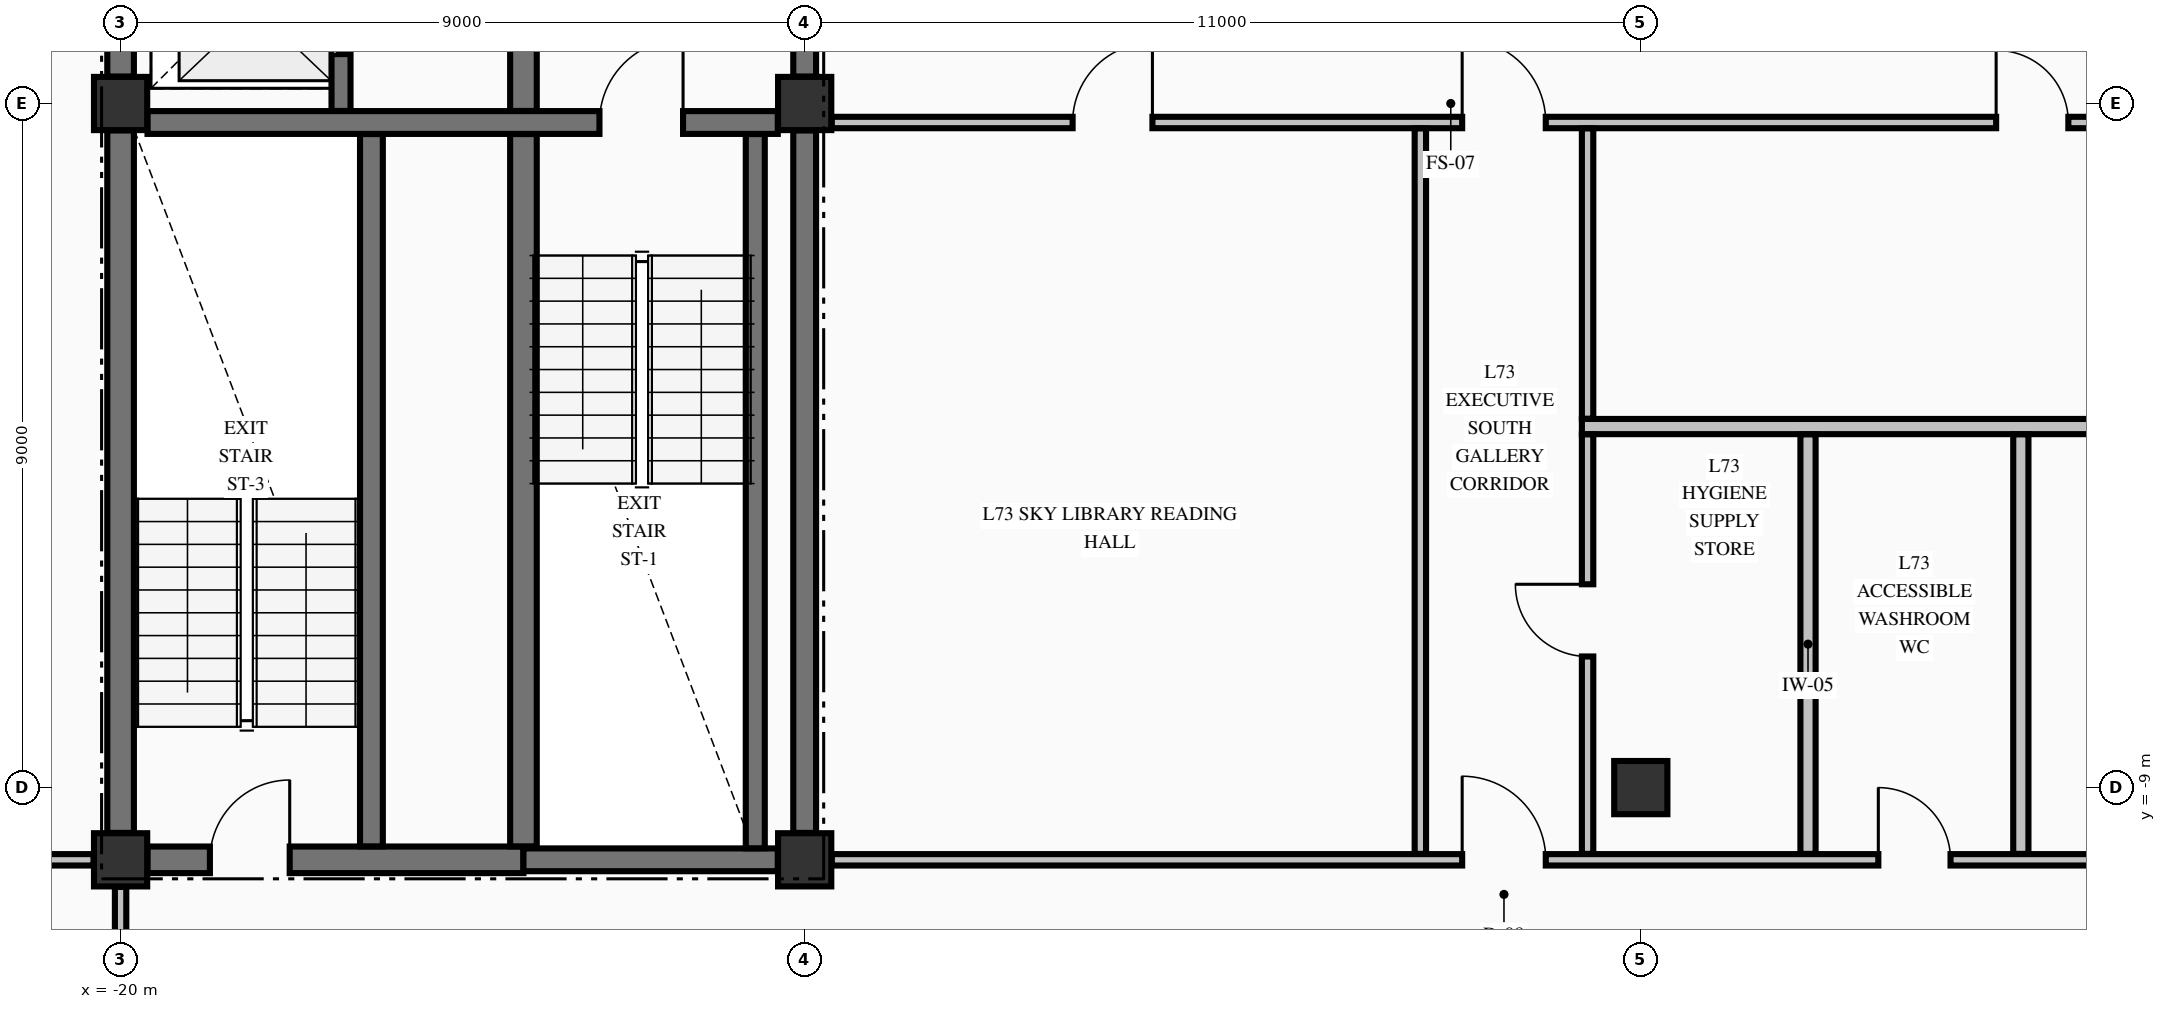
"""IFC4 building model, lengths in metres.
Left out: names, types, materials, properties, quantities, classifications, styles, units other than length and angle.
Written with IfcOpenShell. Run it as: python <this file> out.ifc"""

import sys

from ifc_helpers import new_model, si_unit, direction, frame, frame_2d, origin, origin_2d, place, context, subcontext, project, spatial, rectangle, extrude, element, fill, save


model = new_model("IFC4")
c1 = context("Model", 3, precision=1e-05, world=origin(), true_north=direction((0.0, 1.0)))
c2 = subcontext(c1, "Body", "Model", "MODEL_VIEW")
j1 = project(units=[si_unit("LENGTHUNIT", "METRE"), si_unit("PLANEANGLEUNIT", "RADIAN")], contexts=[c1])
p1 = place(None, origin())
s1 = spatial("IfcSite", under=j1, at=p1, CompositionType="ELEMENT")
p2 = place(p1, origin())
s2 = spatial("IfcBuilding", under=s1, at=p2, CompositionType="ELEMENT")
p3 = place(p2, frame((0.0, 0.0, 274.32)))
s3 = spatial("IfcBuildingStorey", under=s2, at=p3, CompositionType="ELEMENT", Elevation=274.32)
for number, where, z_axis, x_axis in (
    (1, (-20.0, -9.95, -0.25), (0.0, 0.0, 1.0), (1.0, 0.0, 0.0)),
    (2, (-11.0, -9.95, -0.25), (0.0, 0.0, 1.0), (1.0, 0.0, 0.0)),
    (3, (-11.0, 0.0, -0.25), (0.0, 0.0, 1.0), (1.0, 0.0, 0.0)),
    (4, (0.0, -9.0, -0.25), (0.0, 0.0, 1.0), (1.0, 0.0, 0.0)),
    (5, (-20.0, 0.0, -0.25), (0.0, 0.0, 1.0), (1.0, 0.0, 0.0)),
):
    element("IfcColumn", number, at=place(p3, frame(where, z_axis=z_axis, x_axis=x_axis)), inside=s3, PredefinedType="COLUMN", context=c2, shape_type="SweptSolid", body=[
        extrude(rectangle(XDim=0.7, YDim=0.7, at=origin_2d()), origin(), (0.0, 0.0, 1.0), 3.565),
    ])
p4 = place(p3, frame((-19.646, -9.95, 0.0), z_axis=(0.0, 0.0, 1.0), x_axis=(1.0, 0.0, 0.0)))
e6 = element("IfcWall", 6, at=p4, inside=s3, PredefinedType="SHEAR", context=c2, shape_type="SweptSolid", body=[
    extrude(rectangle(XDim=4.946, YDim=0.35, at=frame_2d((2.473, 0.0))), origin(), (0.0, 0.0, 1.0), 3.315),
])
p5 = place(p4, frame((0.821, 0.0, 0.0)))
e7 = element("IfcOpeningElement", 7, at=p5, cuts=e6, PredefinedType="OPENING", context=c2, shape_type="SweptSolid", body=[
    extrude(rectangle(XDim=1.05, YDim=2.15, at=frame_2d((0.525, 1.075))), frame((0.0, 0.185, 0.0), z_axis=(0.0, -1.0, 0.0), x_axis=(1.0, 0.0, 0.0)), (0.0, 0.0, 1.0), 0.37),
])
p6 = place(p3, frame((-14.7, -9.95, 0.0), z_axis=(0.0, 0.0, 1.0), x_axis=(1.0, 0.0, 0.0)))
e8 = element("IfcWall", 8, at=p6, inside=s3, PredefinedType="SHEAR", context=c2, shape_type="SweptSolid", body=[
    extrude(rectangle(XDim=3.346, YDim=0.3, at=frame_2d((1.673, 0.0))), origin(), (0.0, 0.0, 1.0), 3.315),
])
p7 = place(p3, frame((-19.646, -0.25, 0.0), z_axis=(0.0, 0.0, 1.0), x_axis=(1.0, 0.0, 0.0)))
e9 = element("IfcWall", 9, at=p7, inside=s3, PredefinedType="SHEAR", context=c2, shape_type="SweptSolid", body=[
    extrude(rectangle(XDim=8.292, YDim=0.3, at=frame_2d((4.146, 0.0))), origin(), (0.0, 0.0, 1.0), 3.315),
])
p8 = place(p7, frame((5.946, 0.0, 0.0)))
e10 = element("IfcOpeningElement", 10, at=p8, cuts=e9, PredefinedType="OPENING", context=c2, shape_type="SweptSolid", body=[
    extrude(rectangle(XDim=1.1, YDim=2.15, at=frame_2d((0.55, 1.075))), frame((0.0, 0.16, 0.0), z_axis=(0.0, -1.0, 0.0), x_axis=(1.0, 0.0, 0.0)), (0.0, 0.0, 1.0), 0.32),
])
p9 = place(p3, frame((-25.835, -9.95, 0.0), z_axis=(0.0, 0.0, 1.0), x_axis=(1.0, 0.0, 0.0)))
e11 = element("IfcWall", 11, at=p9, inside=s3, PredefinedType="PARTITIONING", context=c2, shape_type="SweptSolid", body=[
    extrude(rectangle(XDim=5.479, YDim=0.15, at=frame_2d((2.74, 0.0))), origin(), (0.0, 0.0, 1.0), 3.315),
])
p10 = place(p9, frame((2.335, 0.0, 0.0)))
e12 = element("IfcOpeningElement", 12, at=p10, cuts=e11, PredefinedType="OPENING", context=c2, shape_type="SweptSolid", body=[
    extrude(rectangle(XDim=1.0, YDim=2.15, at=frame_2d((0.5, 1.075))), frame((0.0, 0.085, 0.0), z_axis=(0.0, -1.0, 0.0), x_axis=(1.0, 0.0, 0.0)), (0.0, 0.0, 1.0), 0.17),
])
p11 = place(p3, frame((-10.644, -9.95, 0.0), z_axis=(0.0, 0.0, 1.0), x_axis=(1.0, 0.0, 0.0)))
e13 = element("IfcWall", 13, at=p11, inside=s3, PredefinedType="PARTITIONING", context=c2, shape_type="SweptSolid", body=[
    extrude(rectangle(XDim=21.288, YDim=0.15, at=frame_2d((10.644, 0.0))), origin(), (0.0, 0.0, 1.0), 3.315),
])
p12 = place(p11, frame((8.294, 0.0, 0.0)))
e14 = element("IfcOpeningElement", 14, at=p12, cuts=e13, PredefinedType="OPENING", context=c2, shape_type="SweptSolid", body=[
    extrude(rectangle(XDim=1.1, YDim=2.15, at=frame_2d((0.55, 1.075))), frame((0.0, 0.085, 0.0), z_axis=(0.0, -1.0, 0.0), x_axis=(1.0, 0.0, 0.0)), (0.0, 0.0, 1.0), 0.17),
])
p13 = place(p11, frame((13.769, 0.0, 0.0)))
e15 = element("IfcOpeningElement", 15, at=p13, cuts=e13, PredefinedType="OPENING", context=c2, shape_type="SweptSolid", body=[
    extrude(rectangle(XDim=0.95, YDim=2.15, at=frame_2d((0.475, 1.075))), frame((0.0, 0.085, 0.0), z_axis=(0.0, -1.0, 0.0), x_axis=(1.0, 0.0, 0.0)), (0.0, 0.0, 1.0), 0.17),
])
p14 = place(p11, frame((17.994, 0.0, 0.0)))
e16 = element("IfcOpeningElement", 16, at=p14, cuts=e13, PredefinedType="OPENING", context=c2, shape_type="SweptSolid", body=[
    extrude(rectangle(XDim=0.9, YDim=2.15, at=frame_2d((0.45, 1.075))), frame((0.0, 0.085, 0.0), z_axis=(0.0, -1.0, 0.0), x_axis=(1.0, 0.0, 0.0)), (0.0, 0.0, 1.0), 0.17),
])
p15 = place(p3, frame((-0.775, -4.25, 0.0), z_axis=(0.0, 0.0, 1.0), x_axis=(1.0, 0.0, 0.0)))
e17 = element("IfcWall", 17, at=p15, inside=s3, PredefinedType="PARTITIONING", context=c2, shape_type="SweptSolid", body=[
    extrude(rectangle(XDim=11.622, YDim=0.2, at=frame_2d((5.811, 0.0))), origin(), (0.0, 0.0, 1.0), 3.315),
])
p16 = place(p3, frame((-10.644, -0.25, 0.0), z_axis=(0.0, 0.0, 1.0), x_axis=(1.0, 0.0, 0.0)))
e18 = element("IfcWall", 18, at=p16, inside=s3, PredefinedType="PARTITIONING", context=c2, shape_type="SweptSolid", body=[
    extrude(rectangle(XDim=21.288, YDim=0.15, at=frame_2d((10.644, 0.0))), origin(), (0.0, 0.0, 1.0), 3.315),
])
p17 = place(p16, frame((8.294, 0.0, 0.0)))
e19 = element("IfcOpeningElement", 19, at=p17, cuts=e18, PredefinedType="OPENING", context=c2, shape_type="SweptSolid", body=[
    extrude(rectangle(XDim=1.1, YDim=2.15, at=frame_2d((0.55, 1.075))), frame((0.0, 0.085, 0.0), z_axis=(0.0, -1.0, 0.0), x_axis=(1.0, 0.0, 0.0)), (0.0, 0.0, 1.0), 0.17),
])
p18 = place(p16, frame((3.169, 0.0, 0.0)))
e20 = element("IfcOpeningElement", 20, at=p18, cuts=e18, PredefinedType="OPENING", context=c2, shape_type="SweptSolid", body=[
    extrude(rectangle(XDim=1.05, YDim=2.15, at=frame_2d((0.525, 1.075))), frame((0.0, 0.085, 0.0), z_axis=(0.0, -1.0, 0.0), x_axis=(1.0, 0.0, 0.0)), (0.0, 0.0, 1.0), 0.17),
])
p19 = place(p16, frame((15.319, 0.0, 0.0)))
e21 = element("IfcOpeningElement", 21, at=p19, cuts=e18, PredefinedType="OPENING", context=c2, shape_type="SweptSolid", body=[
    extrude(rectangle(XDim=0.95, YDim=2.15, at=frame_2d((0.475, 1.075))), frame((0.0, 0.085, 0.0), z_axis=(0.0, -1.0, 0.0), x_axis=(1.0, 0.0, 0.0)), (0.0, 0.0, 1.0), 0.17),
])
p20 = place(p3, frame((-20.0, -9.596, 0.0), z_axis=(0.0, 0.0, 1.0), x_axis=(0.0, 1.0, 0.0)))
e22 = element("IfcWall", 22, at=p20, inside=s3, PredefinedType="SHEAR", context=c2, shape_type="SweptSolid", body=[
    extrude(rectangle(XDim=9.242, YDim=0.35, at=frame_2d((4.621, 0.0))), origin(), (0.0, 0.0, 1.0), 3.315),
])
p21 = place(p3, frame((-20.0, 0.354, 0.0), z_axis=(0.0, 0.0, 1.0), x_axis=(0.0, 1.0, 0.0)))
e23 = element("IfcWall", 23, at=p21, inside=s3, PredefinedType="SHEAR", context=c2, shape_type="SweptSolid", body=[
    extrude(rectangle(XDim=2.169, YDim=0.35, at=frame_2d((1.084, 0.0))), origin(), (0.0, 0.0, 1.0), 3.315),
])
p22 = place(p3, frame((-17.1, -0.098, 0.0), z_axis=(0.0, 0.0, 1.0), x_axis=(0.0, 1.0, 0.0)))
e24 = element("IfcWall", 24, at=p22, inside=s3, PredefinedType="SOLIDWALL", context=c2, shape_type="SweptSolid", body=[
    extrude(rectangle(XDim=2.621, YDim=0.25, at=frame_2d((1.311, 0.0))), origin(), (0.0, 0.0, 1.0), 3.315),
])
p23 = place(p22, frame((0.748, 0.0, 0.0)))
e25 = element("IfcOpeningElement", 25, at=p23, cuts=e24, PredefinedType="OPENING", context=c2, shape_type="SweptSolid", body=[
    extrude(rectangle(XDim=1.1, YDim=2.2, at=frame_2d((0.55, 1.1))), frame((0.0, 0.135, 0.0), z_axis=(0.0, -1.0, 0.0), x_axis=(1.0, 0.0, 0.0)), (0.0, 0.0, 1.0), 0.27),
])
p24 = place(p3, frame((-16.7, -9.773, 0.0), z_axis=(0.0, 0.0, 1.0), x_axis=(0.0, 1.0, 0.0)))
e26 = element("IfcWall", 26, at=p24, inside=s3, PredefinedType="SHEAR", context=c2, shape_type="SweptSolid", body=[
    extrude(rectangle(XDim=9.371, YDim=0.3, at=frame_2d((4.686, 0.0))), origin(), (0.0, 0.0, 1.0), 3.315),
])
p25 = place(p3, frame((-14.7, -9.773, 0.0), z_axis=(0.0, 0.0, 1.0), x_axis=(0.0, 1.0, 0.0)))
e27 = element("IfcWall", 27, at=p25, inside=s3, PredefinedType="SHEAR", context=c2, shape_type="SweptSolid", body=[
    extrude(rectangle(XDim=9.371, YDim=0.35, at=frame_2d((4.686, 0.0))), origin(), (0.0, 0.0, 1.0), 3.315),
])
p26 = place(p3, frame((-14.7, -0.098, 0.0), z_axis=(0.0, 0.0, 1.0), x_axis=(0.0, 1.0, 0.0)))
e28 = element("IfcWall", 28, at=p26, inside=s3, PredefinedType="SHEAR", context=c2, shape_type="SweptSolid", body=[
    extrude(rectangle(XDim=2.846, YDim=0.35, at=frame_2d((1.423, 0.0))), origin(), (0.0, 0.0, 1.0), 3.315),
])
p27 = place(p3, frame((-11.65, -9.798, 0.0), z_axis=(0.0, 0.0, 1.0), x_axis=(0.0, 1.0, 0.0)))
e29 = element("IfcWall", 29, at=p27, inside=s3, PredefinedType="SOLIDWALL", context=c2, shape_type="SweptSolid", body=[
    extrude(rectangle(XDim=9.396, YDim=0.25, at=frame_2d((4.698, 0.0))), origin(), (0.0, 0.0, 1.0), 3.315),
])
p28 = place(p3, frame((-11.0, -9.596, 0.0), z_axis=(0.0, 0.0, 1.0), x_axis=(0.0, 1.0, 0.0)))
e30 = element("IfcWall", 30, at=p28, inside=s3, PredefinedType="SHEAR", context=c2, shape_type="SweptSolid", body=[
    extrude(rectangle(XDim=9.242, YDim=0.3, at=frame_2d((4.621, 0.0))), origin(), (0.0, 0.0, 1.0), 3.315),
])
p29 = place(p3, frame((-11.0, 0.354, 0.0), z_axis=(0.0, 0.0, 1.0), x_axis=(0.0, 1.0, 0.0)))
e31 = element("IfcWall", 31, at=p29, inside=s3, PredefinedType="SHEAR", context=c2, shape_type="SweptSolid", body=[
    extrude(rectangle(XDim=2.394, YDim=0.3, at=frame_2d((1.197, 0.0))), origin(), (0.0, 0.0, 1.0), 3.315),
])
p30 = place(p29, frame((0.746, 0.0, 0.0)))
e32 = element("IfcOpeningElement", 32, at=p30, cuts=e31, PredefinedType="OPENING", context=c2, shape_type="SweptSolid", body=[
    extrude(rectangle(XDim=1.1, YDim=2.15, at=frame_2d((0.55, 1.075))), frame((0.0, 0.16, 0.0), z_axis=(0.0, -1.0, 0.0), x_axis=(1.0, 0.0, 0.0)), (0.0, 0.0, 1.0), 0.32),
])
p31 = place(p3, frame((-20.0, -12.972, 0.0), z_axis=(0.0, 0.0, 1.0), x_axis=(0.0, 1.0, 0.0)))
e33 = element("IfcWall", 33, at=p31, inside=s3, PredefinedType="PARTITIONING", context=c2, shape_type="SweptSolid", body=[
    extrude(rectangle(XDim=2.666, YDim=0.15, at=frame_2d((1.333, 0.0))), origin(), (0.0, 0.0, 1.0), 3.315),
])
p32 = place(p31, frame((0.997, 0.0, 0.0)))
e34 = element("IfcOpeningElement", 34, at=p32, cuts=e33, PredefinedType="OPENING", context=c2, shape_type="SweptSolid", body=[
    extrude(rectangle(XDim=0.95, YDim=2.15, at=frame_2d((0.475, 1.075))), frame((0.0, 0.085, 0.0), z_axis=(0.0, -1.0, 0.0), x_axis=(1.0, 0.0, 0.0)), (0.0, 0.0, 1.0), 0.17),
])
p33 = place(p3, frame((-2.9, -9.872, 0.0), z_axis=(0.0, 0.0, 1.0), x_axis=(0.0, 1.0, 0.0)))
e35 = element("IfcWall", 35, at=p33, inside=s3, PredefinedType="PARTITIONING", context=c2, shape_type="SweptSolid", body=[
    extrude(rectangle(XDim=9.544, YDim=0.15, at=frame_2d((4.772, 0.0))), origin(), (0.0, 0.0, 1.0), 3.315),
])
p34 = place(p3, frame((-0.7, -9.872, 0.0), z_axis=(0.0, 0.0, 1.0), x_axis=(0.0, 1.0, 0.0)))
e36 = element("IfcWall", 36, at=p34, inside=s3, PredefinedType="PARTITIONING", context=c2, shape_type="SweptSolid", body=[
    extrude(rectangle(XDim=5.519, YDim=0.15, at=frame_2d((2.76, 0.0))), origin(), (0.0, 0.0, 1.0), 3.315),
])
p35 = place(p34, frame((2.597, 0.0, 0.0)))
e37 = element("IfcOpeningElement", 37, at=p35, cuts=e36, PredefinedType="OPENING", context=c2, shape_type="SweptSolid", body=[
    extrude(rectangle(XDim=0.95, YDim=2.15, at=frame_2d((0.475, 1.075))), frame((0.0, 0.085, 0.0), z_axis=(0.0, -1.0, 0.0), x_axis=(1.0, 0.0, 0.0)), (0.0, 0.0, 1.0), 0.17),
])
p36 = place(p3, frame((-0.7, -4.147, 0.0), z_axis=(0.0, 0.0, 1.0), x_axis=(0.0, 1.0, 0.0)))
e38 = element("IfcWall", 38, at=p36, inside=s3, PredefinedType="PARTITIONING", context=c2, shape_type="SweptSolid", body=[
    extrude(rectangle(XDim=3.819, YDim=0.15, at=frame_2d((1.91, 0.0))), origin(), (0.0, 0.0, 1.0), 3.315),
])
for number, where, z_axis, x_axis in (
    (39, (2.2, -9.872, 0.0), (0.0, 0.0, 1.0), (0.0, 1.0, 0.0)),
    (40, (5.0, -9.872, 0.0), (0.0, 0.0, 1.0), (0.0, 1.0, 0.0)),
):
    element("IfcWall", number, at=place(p3, frame(where, z_axis=z_axis, x_axis=x_axis)), inside=s3, PredefinedType="PARTITIONING", context=c2, shape_type="SweptSolid", body=[
        extrude(rectangle(XDim=5.519, YDim=0.2, at=frame_2d((2.76, 0.0))), origin(), (0.0, 0.0, 1.0), 3.315),
    ])
p37 = place(p8, origin())
e41 = element("IfcDoor", 41, at=p37, inside=s3, OperationType="SINGLE_SWING_RIGHT", PredefinedType="DOOR", context=c2, shape_type="SweptSolid", body=[
    extrude(rectangle(XDim=1.1, YDim=2.15, at=frame_2d((0.55, 1.075))), frame((0.0, 0.025, 0.0), z_axis=(0.0, -1.0, 0.0), x_axis=(1.0, 0.0, 0.0)), (0.0, 0.0, 1.0), 0.05),
])
fill(e10, e41)
p38 = place(p5, origin())
e42 = element("IfcDoor", 42, at=p38, inside=s3, OperationType="SINGLE_SWING_RIGHT", PredefinedType="DOOR", context=c2, shape_type="SweptSolid", body=[
    extrude(rectangle(XDim=1.05, YDim=2.15, at=frame_2d((0.525, 1.075))), frame((0.0, 0.025, 0.0), z_axis=(0.0, -1.0, 0.0), x_axis=(1.0, 0.0, 0.0)), (0.0, 0.0, 1.0), 0.05),
])
fill(e7, e42)
p39 = place(p23, origin())
e43 = element("IfcDoor", 43, at=p39, inside=s3, OperationType="SLIDING_TO_LEFT", PredefinedType="DOOR", context=c2, shape_type="SweptSolid", body=[
    extrude(rectangle(XDim=1.1, YDim=2.2, at=frame_2d((0.55, 1.1))), frame((0.0, 0.025, 0.0), z_axis=(0.0, -1.0, 0.0), x_axis=(1.0, 0.0, 0.0)), (0.0, 0.0, 1.0), 0.05),
])
fill(e25, e43)
p40 = place(p12, origin())
e44 = element("IfcDoor", 44, at=p40, inside=s3, OperationType="SINGLE_SWING_LEFT", PredefinedType="DOOR", context=c2, shape_type="SweptSolid", body=[
    extrude(rectangle(XDim=1.1, YDim=2.15, at=frame_2d((0.55, 1.075))), frame((0.0, 0.025, 0.0), z_axis=(0.0, -1.0, 0.0), x_axis=(1.0, 0.0, 0.0)), (0.0, 0.0, 1.0), 0.05),
])
fill(e14, e44)
p41 = place(p17, origin())
e45 = element("IfcDoor", 45, at=p41, inside=s3, OperationType="SINGLE_SWING_LEFT", PredefinedType="DOOR", context=c2, shape_type="SweptSolid", body=[
    extrude(rectangle(XDim=1.1, YDim=2.15, at=frame_2d((0.55, 1.075))), frame((0.0, 0.025, 0.0), z_axis=(0.0, -1.0, 0.0), x_axis=(1.0, 0.0, 0.0)), (0.0, 0.0, 1.0), 0.05),
])
fill(e19, e45)
p42 = place(p18, origin())
e46 = element("IfcDoor", 46, at=p42, inside=s3, OperationType="SINGLE_SWING_RIGHT", PredefinedType="DOOR", context=c2, shape_type="SweptSolid", body=[
    extrude(rectangle(XDim=1.05, YDim=2.15, at=frame_2d((0.525, 1.075))), frame((0.0, 0.025, 0.0), z_axis=(0.0, -1.0, 0.0), x_axis=(1.0, 0.0, 0.0)), (0.0, 0.0, 1.0), 0.05),
])
fill(e20, e46)
p43 = place(p19, origin())
e47 = element("IfcDoor", 47, at=p43, inside=s3, OperationType="SINGLE_SWING_LEFT", PredefinedType="DOOR", context=c2, shape_type="SweptSolid", body=[
    extrude(rectangle(XDim=0.95, YDim=2.15, at=frame_2d((0.475, 1.075))), frame((0.0, 0.025, 0.0), z_axis=(0.0, -1.0, 0.0), x_axis=(1.0, 0.0, 0.0)), (0.0, 0.0, 1.0), 0.05),
])
fill(e21, e47)
p44 = place(p35, origin())
e48 = element("IfcDoor", 48, at=p44, inside=s3, OperationType="SINGLE_SWING_RIGHT", PredefinedType="DOOR", context=c2, shape_type="SweptSolid", body=[
    extrude(rectangle(XDim=0.95, YDim=2.15, at=frame_2d((0.475, 1.075))), frame((0.0, 0.025, 0.0), z_axis=(0.0, -1.0, 0.0), x_axis=(1.0, 0.0, 0.0)), (0.0, 0.0, 1.0), 0.05),
])
fill(e37, e48)
p45 = place(p13, origin())
e49 = element("IfcDoor", 49, at=p45, inside=s3, OperationType="SINGLE_SWING_LEFT", PredefinedType="DOOR", context=c2, shape_type="SweptSolid", body=[
    extrude(rectangle(XDim=0.95, YDim=2.15, at=frame_2d((0.475, 1.075))), frame((0.0, 0.025, 0.0), z_axis=(0.0, -1.0, 0.0), x_axis=(1.0, 0.0, 0.0)), (0.0, 0.0, 1.0), 0.05),
])
fill(e15, e49)
save(model, sys.argv[1])
